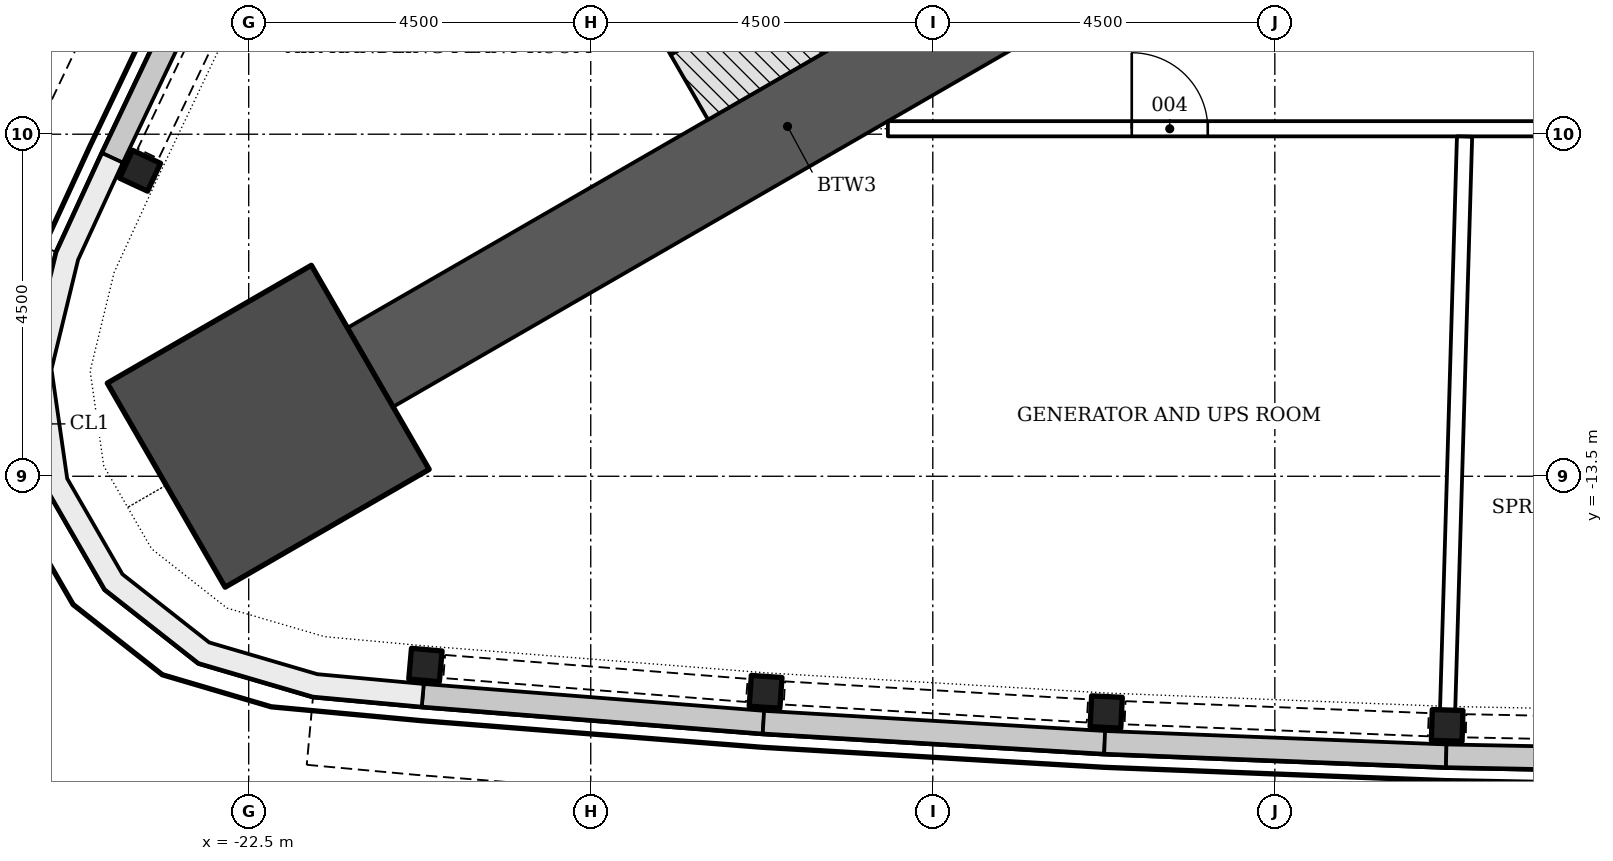
"""IFC4 building model, lengths in metres.
Left out: names, types, materials, properties, quantities, classifications, styles, units other than length and angle.
Written with IfcOpenShell. Run it as: python <this file> out.ifc"""

import sys

from ifc_helpers import new_model, si_unit, direction, frame, frame_2d, origin, origin_2d, place, context, subcontext, project, spatial, polyline, rectangle, i_section, outline, extrude, element, fill, save


model = new_model("IFC4")
c1 = context("Model", 3, precision=1e-05, world=origin(), true_north=direction((0.0, 1.0)))
c2 = subcontext(c1, "Body", "Model", "MODEL_VIEW")
j1 = project(units=[si_unit("LENGTHUNIT", "METRE"), si_unit("PLANEANGLEUNIT", "RADIAN")], contexts=[c1])
p1 = place(None, origin())
s1 = spatial("IfcSite", under=j1, at=p1, CompositionType="ELEMENT")
p2 = place(p1, origin())
s2 = spatial("IfcBuilding", under=s1, at=p2, CompositionType="ELEMENT")
p3 = place(p2, frame((0.0, 0.0, 87.0)))
s3 = spatial("IfcBuildingStorey", under=s2, at=p3, CompositionType="ELEMENT", Elevation=87.0)
p4 = place(p3, frame((-9.922, -5.728, -0.3), z_axis=(0.0, 0.0, 1.0), x_axis=(-0.866029086277, -0.499993621681, 0.0)))
e1 = element("IfcWall", 1, at=p4, inside=s3, PredefinedType="SHEAR", context=c2, shape_type="SweptSolid", body=[
    extrude(rectangle(XDim=12.677, YDim=1.2, at=frame_2d((6.339, 0.0))), origin(), (0.0, 0.0, 1.0), 4.6),
])
p5 = place(p3, frame((-22.243, -12.842, -0.3), z_axis=(0.0, 0.0, 1.0), x_axis=(-0.866025403784, -0.5, 0.0)))
e2 = element("IfcColumn", 2, at=p5, inside=s3, PredefinedType="COLUMN", context=c2, shape_type="SweptSolid", body=[
    extrude(rectangle(XDim=3.1, YDim=3.1, at=origin_2d()), origin(), (0.0, 0.0, 1.0), 4.6),
])
for number, where, z_axis, x_axis in (
    (3, (-23.929, -9.48, -0.3), (0.0, 0.0, 1.0), (-0.421, -0.907, 0.0)),
    (4, (-20.175, -15.983, -0.3), (0.0, 0.0, 1.0), (0.996, -0.088, 0.0)),
    (5, (-15.7, -16.336, -0.3), (0.0, 0.0, 1.0), (0.998, -0.069, 0.0)),
    (6, (-11.219, -16.601, -0.3), (0.0, 0.0, 1.0), (0.999, -0.049, 0.0)),
    (7, (-6.733, -16.778, -0.3), (0.0, 0.0, 1.0), (1.0, -0.03, 0.0)),
):
    element("IfcColumn", number, at=place(p3, frame(where, z_axis=z_axis, x_axis=x_axis)), inside=s3, PredefinedType="COLUMN", context=c2, shape_type="SweptSolid", body=[
        extrude(i_section(OverallWidth=0.404, OverallDepth=0.406, WebThickness=0.027, FlangeThickness=0.044, FilletRadius=0.015, at=origin_2d()), origin(), (0.0, 0.0, 1.0), 4.6),
    ])
p6 = place(p3, origin())
e8 = element("IfcWall", 8, at=p6, inside=s3, PredefinedType="NOTDEFINED", context=c2, shape_type="SweptSolid", body=[
    extrude(outline(polyline([(-22.492, -5.187), (-24.428, -9.249), (-24.157, -9.378), (-22.221, -5.316), (-22.492, -5.187)])), origin(), (0.0, 0.0, 1.0), 1.2),
])
p7 = place(p3, origin())
e9 = element("IfcWall", 9, at=p7, inside=s3, PredefinedType="NOTDEFINED", context=c2, shape_type="SweptSolid", body=[
    extrude(outline(polyline([(-20.224, -16.531), (-15.738, -16.885), (-15.714, -16.586), (-20.2, -16.232), (-20.224, -16.531)])), origin(), (0.0, 0.0, 1.0), 1.2),
])
p8 = place(p3, origin())
e10 = element("IfcWall", 10, at=p8, inside=s3, PredefinedType="NOTDEFINED", context=c2, shape_type="SweptSolid", body=[
    extrude(outline(polyline([(-15.738, -16.885), (-11.245, -17.151), (-11.228, -16.851), (-15.72, -16.586), (-15.738, -16.885)])), origin(), (0.0, 0.0, 1.0), 1.2),
])
p9 = place(p3, origin())
e11 = element("IfcWall", 11, at=p9, inside=s3, PredefinedType="NOTDEFINED", context=c2, shape_type="SweptSolid", body=[
    extrude(outline(polyline([(-11.245, -17.151), (-6.749, -17.328), (-6.737, -17.028), (-11.234, -16.851), (-11.245, -17.151)])), origin(), (0.0, 0.0, 1.0), 1.2),
])
p10 = place(p3, origin())
e12 = element("IfcWall", 12, at=p10, inside=s3, PredefinedType="NOTDEFINED", context=c2, shape_type="SweptSolid", body=[
    extrude(outline(polyline([(-6.749, -17.328), (-2.25, -17.417), (-2.244, -17.116), (-6.743, -17.028), (-6.749, -17.328)])), origin(), (0.0, 0.0, 1.0), 1.2),
])
p11 = place(p3, origin())
e13 = element("IfcWall", 13, at=p11, inside=s3, PredefinedType="NOTDEFINED", context=c2, shape_type="SweptSolid", body=[
    extrude(outline(polyline([(-24.428, -9.249), (-25.03, -10.553), (-25.4, -12.077), (-25.177, -13.63), (-24.392, -14.989), (-23.159, -15.958), (-21.654, -16.4), (-20.224, -16.531), (-20.196, -16.232), (-21.597, -16.104), (-23.019, -15.687), (-24.161, -14.789), (-24.888, -13.53), (-25.094, -12.092), (-24.745, -10.652), (-24.156, -9.374), (-24.428, -9.249)])), origin(), (0.0, 0.0, 1.0), 4.3),
])
p12 = place(p3, frame((-10.468, -4.782, -0.3), z_axis=(0.0, 0.0, 1.0), x_axis=(-0.866018442252, -0.500012057535, 0.0)))
e14 = element("IfcWall", 14, at=p12, inside=s3, PredefinedType="SHEAR", context=c2, shape_type="SweptSolid", body=[
    extrude(rectangle(XDim=7.2, YDim=0.986, at=frame_2d((3.6, 0.0))), origin(), (0.0, 0.0, 1.0), 4.6),
])
p13 = place(p3, frame((0.0, 0.0, -0.3)))
e15 = element("IfcWall", 15, at=p13, inside=s3, PredefinedType="SHEAR", context=c2, shape_type="SweptSolid", body=[
    extrude(outline(polyline([(-17.439, -3.907), (-18.025, -6.093), (-16.95, -7.955), (-16.777, -7.855), (-17.81, -6.065), (-17.267, -4.039), (-17.339, -4.081), (-17.339, -4.081), (-17.339, -4.081), (-17.339, -4.081), (-17.339, -4.081), (-17.339, -4.081), (-17.339, -4.081), (-17.339, -4.081), (-17.339, -4.081), (-17.339, -4.081), (-17.339, -4.081), (-17.339, -4.081), (-17.339, -4.081), (-17.339, -4.081), (-17.339, -4.081), (-17.339, -4.081), (-17.339, -4.081), (-17.439, -3.907)])), origin(), (0.0, 0.0, 1.0), 4.6),
])
p14 = place(p3, frame((-14.091, -8.928, 0.0), z_axis=(0.0, 0.0, 1.0), x_axis=(1.0, 0.0, 0.0)))
e16 = element("IfcWall", 16, at=p14, inside=s3, PredefinedType="PARTITIONING", context=c2, shape_type="SweptSolid", body=[
    extrude(rectangle(XDim=18.991, YDim=0.2, at=frame_2d((9.495, 0.0))), origin(), (0.0, 0.0, 1.0), 3.678),
])
p15 = place(p14, frame((3.208, 0.0, 0.0)))
e17 = element("IfcOpeningElement", 17, at=p15, cuts=e16, PredefinedType="OPENING", context=c2, shape_type="SweptSolid", body=[
    extrude(rectangle(XDim=1.0, YDim=2.1, at=frame_2d((0.5, 1.05))), frame((0.0, 0.11, 0.0), z_axis=(0.0, -1.0, 0.0), x_axis=(1.0, 0.0, 0.0)), (0.0, 0.0, 1.0), 0.22),
])
p16 = place(p14, frame((9.359, 0.0, 0.0)))
e18 = element("IfcOpeningElement", 18, at=p16, cuts=e16, PredefinedType="OPENING", context=c2, shape_type="SweptSolid", body=[
    extrude(rectangle(XDim=1.0, YDim=2.1, at=frame_2d((0.5, 1.05))), frame((0.0, 0.11, 0.0), z_axis=(0.0, -1.0, 0.0), x_axis=(1.0, 0.0, 0.0)), (0.0, 0.0, 1.0), 0.22),
])
p17 = place(p14, frame((13.49, 0.0, 0.0)))
e19 = element("IfcOpeningElement", 19, at=p17, cuts=e16, PredefinedType="OPENING", context=c2, shape_type="SweptSolid", body=[
    extrude(rectangle(XDim=1.0, YDim=2.1, at=frame_2d((0.5, 1.05))), frame((0.0, 0.11, 0.0), z_axis=(0.0, -1.0, 0.0), x_axis=(1.0, 0.0, 0.0)), (0.0, 0.0, 1.0), 0.22),
])
p18 = place(p14, frame((17.013, 0.0, 0.0)))
e20 = element("IfcOpeningElement", 20, at=p18, cuts=e16, PredefinedType="OPENING", context=c2, shape_type="SweptSolid", body=[
    extrude(rectangle(XDim=1.0, YDim=2.1, at=frame_2d((0.5, 1.05))), frame((0.0, 0.11, 0.0), z_axis=(0.0, -1.0, 0.0), x_axis=(1.0, 0.0, 0.0)), (0.0, 0.0, 1.0), 0.22),
])
p19 = place(p3, frame((-6.729, -16.628, 0.0), z_axis=(0.0, 0.0, 1.0), x_axis=(0.029552918332, 0.999563217119, 0.0)))
e21 = element("IfcWall", 21, at=p19, inside=s3, PredefinedType="PARTITIONING", context=c2, shape_type="SweptSolid", body=[
    extrude(rectangle(XDim=7.6, YDim=0.2, at=frame_2d((3.8, 0.0))), origin(), (0.0, 0.0, 1.0), 3.678),
])
p20 = place(p15, origin())
e22 = element("IfcDoor", 22, at=p20, inside=s3, OperationType="SINGLE_SWING_LEFT", PredefinedType="DOOR", context=c2, shape_type="SweptSolid", body=[
    extrude(rectangle(XDim=1.0, YDim=2.1, at=frame_2d((0.5, 1.05))), frame((0.0, 0.025, 0.0), z_axis=(0.0, -1.0, 0.0), x_axis=(1.0, 0.0, 0.0)), (0.0, 0.0, 1.0), 0.05),
])
fill(e17, e22)
save(model, sys.argv[1])
